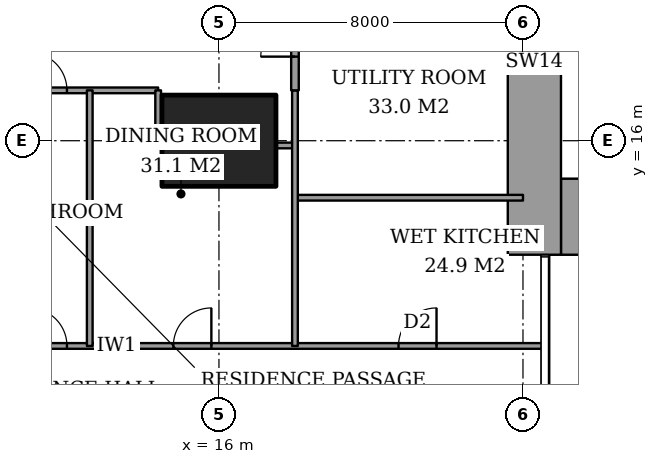
"""IFC4 building model, lengths in metres.
Left out: names, types, materials, properties, quantities, classifications, styles, units other than length and angle.
Written with IfcOpenShell. Run it as: python <this file> out.ifc"""

import sys

from ifc_helpers import new_model, si_unit, direction, frame, frame_2d, origin, origin_2d, place, context, subcontext, project, spatial, rectangle, extrude, element, fill, save


model = new_model("IFC4")
c1 = context("Model", 3, precision=1e-05, world=origin(), true_north=direction((0.0, 1.0)))
c2 = subcontext(c1, "Body", "Model", "MODEL_VIEW")
j1 = project(units=[si_unit("LENGTHUNIT", "METRE"), si_unit("PLANEANGLEUNIT", "RADIAN")], contexts=[c1])
p1 = place(None, origin())
s1 = spatial("IfcSite", under=j1, at=p1, CompositionType="ELEMENT")
p2 = place(p1, origin())
s2 = spatial("IfcBuilding", under=s1, at=p2, CompositionType="ELEMENT")
p3 = place(p2, frame((0.0, 0.0, 33.2)))
s3 = spatial("IfcBuildingStorey", under=s2, at=p3, CompositionType="ELEMENT", Elevation=33.2)
p4 = place(p3, frame((16.0, 16.0, 0.0), z_axis=(0.0, 0.0, 1.0), x_axis=(1.0, 0.0, 0.0)))
e1 = element("IfcColumn", 1, at=p4, inside=s3, PredefinedType="COLUMN", context=c2, shape_type="SweptSolid", body=[
    extrude(rectangle(XDim=3.0, YDim=2.4, at=origin_2d()), origin(), (0.0, 0.0, 1.0), 3.6),
])
p5 = place(p3, frame((25.0, 14.0, 0.0), z_axis=(0.0, 0.0, 1.0), x_axis=(1.0, 0.0, 0.0)))
e2 = element("IfcWall", 2, at=p5, inside=s3, PredefinedType="SHEAR", context=c2, shape_type="SweptSolid", body=[
    extrude(rectangle(XDim=3.15, YDim=2.0, at=frame_2d((1.575, 0.0))), origin(), (0.0, 0.0, 1.0), 3.6),
])
p6 = place(p3, frame((24.3, 13.0, 0.0), z_axis=(0.0, 0.0, 1.0), x_axis=(0.0, 1.0, 0.0)))
e3 = element("IfcWall", 3, at=p6, inside=s3, PredefinedType="SHEAR", context=c2, shape_type="SweptSolid", body=[
    extrude(rectangle(XDim=10.15, YDim=1.4, at=frame_2d((5.075, 0.0))), origin(), (0.0, 0.0, 1.0), 3.6),
])
p7 = place(p3, frame((-0.45, 10.6, 0.0), z_axis=(0.0, 0.0, 1.0), x_axis=(1.0, 0.0, 0.0)))
e4 = element("IfcWall", 4, at=p7, inside=s3, PredefinedType="PARTITIONING", context=c2, shape_type="SweptSolid", body=[
    extrude(rectangle(XDim=25.011, YDim=0.15, at=frame_2d((12.505, 0.0))), origin(), (0.0, 0.0, 1.0), 3.35),
])
p8 = place(p7, frame((11.45, 0.0, 0.0)))
e5 = element("IfcOpeningElement", 5, at=p8, cuts=e4, PredefinedType="OPENING", context=c2, shape_type="SweptSolid", body=[
    extrude(rectangle(XDim=1.0, YDim=2.1, at=frame_2d((0.5, 1.05))), frame((0.0, 0.085, 0.0), z_axis=(0.0, -1.0, 0.0), x_axis=(1.0, 0.0, 0.0)), (0.0, 0.0, 1.0), 0.17),
])
p9 = place(p7, frame((3.087, 0.0, 0.0)))
e6 = element("IfcOpeningElement", 6, at=p9, cuts=e4, PredefinedType="OPENING", context=c2, shape_type="SweptSolid", body=[
    extrude(rectangle(XDim=1.0, YDim=2.1, at=frame_2d((0.5, 1.05))), frame((0.0, 0.085, 0.0), z_axis=(0.0, -1.0, 0.0), x_axis=(1.0, 0.0, 0.0)), (0.0, 0.0, 1.0), 0.17),
])
p10 = place(p7, frame((8.512, 0.0, 0.0)))
e7 = element("IfcOpeningElement", 7, at=p10, cuts=e4, PredefinedType="OPENING", context=c2, shape_type="SweptSolid", body=[
    extrude(rectangle(XDim=1.0, YDim=2.1, at=frame_2d((0.5, 1.05))), frame((0.0, 0.085, 0.0), z_axis=(0.0, -1.0, 0.0), x_axis=(1.0, 0.0, 0.0)), (0.0, 0.0, 1.0), 0.17),
])
p11 = place(p7, frame((15.25, 0.0, 0.0)))
e8 = element("IfcOpeningElement", 8, at=p11, cuts=e4, PredefinedType="OPENING", context=c2, shape_type="SweptSolid", body=[
    extrude(rectangle(XDim=1.0, YDim=2.1, at=frame_2d((0.5, 1.05))), frame((0.0, 0.085, 0.0), z_axis=(0.0, -1.0, 0.0), x_axis=(1.0, 0.0, 0.0)), (0.0, 0.0, 1.0), 0.17),
])
p12 = place(p7, frame((21.175, 0.0, 0.0)))
e9 = element("IfcOpeningElement", 9, at=p12, cuts=e4, PredefinedType="OPENING", context=c2, shape_type="SweptSolid", body=[
    extrude(rectangle(XDim=1.0, YDim=2.1, at=frame_2d((0.5, 1.05))), frame((0.0, 0.085, 0.0), z_axis=(0.0, -1.0, 0.0), x_axis=(1.0, 0.0, 0.0)), (0.0, 0.0, 1.0), 0.17),
])
p13 = place(p3, frame((18.0, 14.5, 0.0), z_axis=(0.0, 0.0, 1.0), x_axis=(1.0, 0.0, 0.0)))
e10 = element("IfcWall", 10, at=p13, inside=s3, PredefinedType="PARTITIONING", context=c2, shape_type="SweptSolid", body=[
    extrude(rectangle(XDim=6.0, YDim=0.15, at=frame_2d((3.0, 0.0))), origin(), (0.0, 0.0, 1.0), 3.35),
])
p14 = place(p3, frame((17.5, 15.875, 0.0), z_axis=(0.0, 0.0, 1.0), x_axis=(1.0, 0.0, 0.0)))
e11 = element("IfcWall", 11, at=p14, inside=s3, PredefinedType="PARTITIONING", context=c2, shape_type="SweptSolid", body=[
    extrude(rectangle(XDim=0.5, YDim=0.15, at=frame_2d((0.25, 0.0))), origin(), (0.0, 0.0, 1.0), 2.634),
])
p15 = place(p3, frame((10.4, 17.325, 0.0), z_axis=(0.0, 0.0, 1.0), x_axis=(1.0, 0.0, 0.0)))
e12 = element("IfcWall", 12, at=p15, inside=s3, PredefinedType="PARTITIONING", context=c2, shape_type="SweptSolid", body=[
    extrude(rectangle(XDim=4.0, YDim=0.15, at=frame_2d((2.0, 0.0))), origin(), (0.0, 0.0, 1.0), 3.35),
])
p16 = place(p15, frame((0.6, 0.0, 0.0)))
e13 = element("IfcOpeningElement", 13, at=p16, cuts=e12, PredefinedType="OPENING", context=c2, shape_type="SweptSolid", body=[
    extrude(rectangle(XDim=1.0, YDim=2.1, at=frame_2d((0.5, 1.05))), frame((0.0, 0.085, 0.0), z_axis=(0.0, -1.0, 0.0), x_axis=(1.0, 0.0, 0.0)), (0.0, 0.0, 1.0), 0.17),
])
p17 = place(p3, frame((12.6, 10.6, 0.0), z_axis=(0.0, 0.0, 1.0), x_axis=(0.0, 1.0, 0.0)))
e14 = element("IfcWall", 14, at=p17, inside=s3, PredefinedType="PARTITIONING", context=c2, shape_type="SweptSolid", body=[
    extrude(rectangle(XDim=6.725, YDim=0.15, at=frame_2d((3.362, 0.0))), origin(), (0.0, 0.0, 1.0), 3.35),
])
p18 = place(p3, frame((14.4, 15.875, 0.0), z_axis=(0.0, 0.0, 1.0), x_axis=(0.0, 1.0, 0.0)))
e15 = element("IfcWall", 15, at=p18, inside=s3, PredefinedType="PARTITIONING", context=c2, shape_type="SweptSolid", body=[
    extrude(rectangle(XDim=1.45, YDim=0.15, at=frame_2d((0.725, 0.0))), origin(), (0.0, 0.0, 1.0), 3.35),
])
p19 = place(p3, frame((18.0, 17.325, 0.0), z_axis=(0.0, 0.0, 1.0), x_axis=(0.0, 1.0, 0.0)))
e16 = element("IfcWall", 16, at=p19, inside=s3, PredefinedType="PARTITIONING", context=c2, shape_type="SweptSolid", body=[
    extrude(rectangle(XDim=6.675, YDim=0.2, at=frame_2d((3.337, 0.0))), origin(), (0.0, 0.0, 1.0), 3.35),
])
p20 = place(p19, frame((4.075, 0.0, 0.0)))
e17 = element("IfcOpeningElement", 17, at=p20, cuts=e16, PredefinedType="OPENING", context=c2, shape_type="SweptSolid", body=[
    extrude(rectangle(XDim=1.2, YDim=2.4, at=frame_2d((0.6, 1.2))), frame((0.0, 0.11, 0.0), z_axis=(0.0, -1.0, 0.0), x_axis=(1.0, 0.0, 0.0)), (0.0, 0.0, 1.0), 0.22),
])
p21 = place(p19, frame((0.887, 0.0, 0.0)))
e18 = element("IfcOpeningElement", 18, at=p21, cuts=e16, PredefinedType="OPENING", context=c2, shape_type="SweptSolid", body=[
    extrude(rectangle(XDim=0.9, YDim=2.1, at=frame_2d((0.45, 1.05))), frame((0.0, 0.11, 0.0), z_axis=(0.0, -1.0, 0.0), x_axis=(1.0, 0.0, 0.0)), (0.0, 0.0, 1.0), 0.22),
])
p22 = place(p3, frame((18.0, 10.6, 0.0), z_axis=(0.0, 0.0, 1.0), x_axis=(0.0, 1.0, 0.0)))
e19 = element("IfcWall", 19, at=p22, inside=s3, PredefinedType="PARTITIONING", context=c2, shape_type="SweptSolid", body=[
    extrude(rectangle(XDim=6.725, YDim=0.15, at=frame_2d((3.362, 0.0))), origin(), (0.0, 0.0, 1.0), 3.35),
])
p23 = place(p8, origin())
e20 = element("IfcDoor", 20, at=p23, inside=s3, OperationType="SINGLE_SWING_RIGHT", PredefinedType="DOOR", context=c2, shape_type="SweptSolid", body=[
    extrude(rectangle(XDim=1.0, YDim=2.1, at=frame_2d((0.5, 1.05))), frame((0.0, 0.025, 0.0), z_axis=(0.0, -1.0, 0.0), x_axis=(1.0, 0.0, 0.0)), (0.0, 0.0, 1.0), 0.05),
])
fill(e5, e20)
p24 = place(p16, origin())
e21 = element("IfcDoor", 21, at=p24, inside=s3, OperationType="SINGLE_SWING_RIGHT", PredefinedType="DOOR", context=c2, shape_type="SweptSolid", body=[
    extrude(rectangle(XDim=1.0, YDim=2.1, at=frame_2d((0.5, 1.05))), frame((0.0, 0.025, 0.0), z_axis=(0.0, -1.0, 0.0), x_axis=(1.0, 0.0, 0.0)), (0.0, 0.0, 1.0), 0.05),
])
fill(e13, e21)
p25 = place(p11, origin())
e22 = element("IfcDoor", 22, at=p25, inside=s3, OperationType="SINGLE_SWING_LEFT", PredefinedType="DOOR", context=c2, shape_type="SweptSolid", body=[
    extrude(rectangle(XDim=1.0, YDim=2.1, at=frame_2d((0.5, 1.05))), frame((0.0, 0.025, 0.0), z_axis=(0.0, -1.0, 0.0), x_axis=(1.0, 0.0, 0.0)), (0.0, 0.0, 1.0), 0.05),
])
fill(e8, e22)
p26 = place(p12, origin())
e23 = element("IfcDoor", 23, at=p26, inside=s3, OperationType="SINGLE_SWING_LEFT", PredefinedType="DOOR", context=c2, shape_type="SweptSolid", body=[
    extrude(rectangle(XDim=1.0, YDim=2.1, at=frame_2d((0.5, 1.05))), frame((0.0, 0.025, 0.0), z_axis=(0.0, -1.0, 0.0), x_axis=(1.0, 0.0, 0.0)), (0.0, 0.0, 1.0), 0.05),
])
fill(e9, e23)
p27 = place(p21, origin())
e24 = element("IfcDoor", 24, at=p27, inside=s3, OperationType="SINGLE_SWING_RIGHT", PredefinedType="DOOR", context=c2, shape_type="SweptSolid", body=[
    extrude(rectangle(XDim=0.9, YDim=2.1, at=frame_2d((0.45, 1.05))), frame((0.0, 0.025, 0.0), z_axis=(0.0, -1.0, 0.0), x_axis=(1.0, 0.0, 0.0)), (0.0, 0.0, 1.0), 0.05),
])
fill(e18, e24)
save(model, sys.argv[1])
